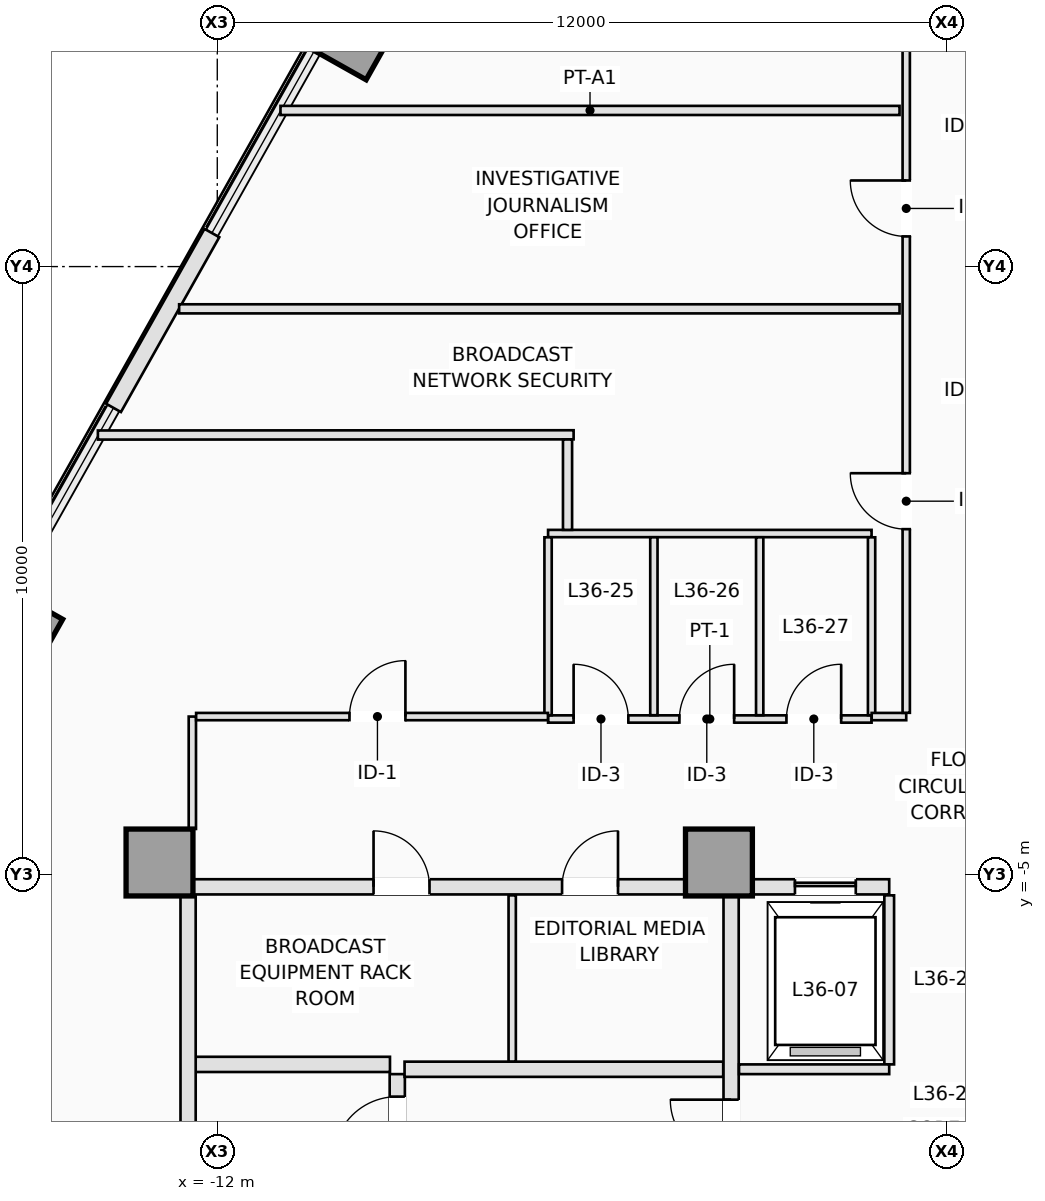
"""IFC4 building model, lengths in metres.
Left out: names, types, materials, properties, quantities, classifications, styles, units other than length and angle.
Written with IfcOpenShell. Run it as: python <this file> out.ifc"""

import sys

from ifc_helpers import new_model, si_unit, direction, frame, frame_2d, origin, origin_2d, place, context, subcontext, project, spatial, rectangle, extrude, element, fill, save


model = new_model("IFC4")
c1 = context("Model", 3, precision=1e-05, world=origin(), true_north=direction((0.0, 1.0)))
c2 = subcontext(c1, "Body", "Model", "MODEL_VIEW")
j1 = project(units=[si_unit("LENGTHUNIT", "METRE"), si_unit("PLANEANGLEUNIT", "RADIAN")], contexts=[c1])
p1 = place(None, origin())
s1 = spatial("IfcSite", under=j1, at=p1, CompositionType="ELEMENT")
p2 = place(p1, origin())
s2 = spatial("IfcBuilding", under=s1, at=p2, CompositionType="ELEMENT")
p3 = place(p2, frame((0.0, 0.0, 133.5)))
s3 = spatial("IfcBuildingStorey", under=s2, at=p3, CompositionType="ELEMENT", Elevation=133.5)
for number, where, z_axis, x_axis in (
    (1, (-12.95, -4.8, 0.0), (0.0, 0.0, 1.0), (1.0, 0.0, 0.0)),
    (2, (-3.75, -4.8, 0.0), (0.0, 0.0, 1.0), (1.0, 0.0, 0.0)),
):
    element("IfcColumn", number, at=place(p3, frame(where, z_axis=z_axis, x_axis=x_axis)), inside=s3, PredefinedType="COLUMN", context=c2, shape_type="SweptSolid", body=[
        extrude(rectangle(XDim=1.1, YDim=1.1, at=origin_2d()), origin(), (0.0, 0.0, 1.0), 3.5),
    ])
for number, where, z_axis, x_axis in (
    (3, (-9.743, 8.753, 0.0), (0.0, 0.0, 1.0), (-0.872, 0.49, 0.0)),
    (4, (-15.224, -0.991, 0.0), (0.0, 0.0, 1.0), (-0.872, 0.49, 0.0)),
):
    element("IfcColumn", number, at=place(p3, frame(where, z_axis=z_axis, x_axis=x_axis)), inside=s3, PredefinedType="COLUMN", context=c2, shape_type="SweptSolid", body=[
        extrude(rectangle(XDim=1.0, YDim=1.0, at=origin_2d()), origin(), (0.0, 0.0, 1.0), 3.5),
    ])
p4 = place(p3, frame((-13.706, 2.677, 0.0), z_axis=(0.0, 0.0, 1.0), x_axis=(0.490285834707, 0.871561701938, 0.0)))
e5 = element("IfcWall", 5, at=p4, inside=s3, PredefinedType="STANDARD", context=c2, shape_type="SweptSolid", body=[
    extrude(rectangle(XDim=3.299, YDim=0.28, at=frame_2d((1.649, 0.0))), origin(), (0.0, 0.0, 1.0), 3.25),
])
p5 = place(p3, frame((-9.04, -10.18, 0.0), z_axis=(0.0, 0.0, 1.0), x_axis=(0.0, 1.0, 0.0)))
e6 = element("IfcWall", 6, at=p5, inside=s3, PredefinedType="PARTITIONING", context=c2, shape_type="SweptSolid", body=[
    extrude(rectangle(XDim=1.9, YDim=0.25, at=frame_2d((0.95, 0.0))), origin(), (0.0, 0.0, 1.0), 3.25),
])
p6 = place(p5, frame((0.48, 0.0, 0.0)))
e7 = element("IfcOpeningElement", 7, at=p6, cuts=e6, PredefinedType="OPENING", context=c2, shape_type="SweptSolid", body=[
    extrude(rectangle(XDim=1.05, YDim=2.15, at=frame_2d((0.525, 1.075))), frame((0.0, 0.135, 0.0), z_axis=(0.0, -1.0, 0.0), x_axis=(1.0, 0.0, 0.0)), (0.0, 0.0, 1.0), 0.27),
])
p7 = place(p3, frame((-12.38, -8.12, 0.0), z_axis=(0.0, 0.0, 1.0), x_axis=(1.0, 0.0, 0.0)))
e8 = element("IfcWall", 8, at=p7, inside=s3, PredefinedType="PARTITIONING", context=c2, shape_type="SweptSolid", body=[
    extrude(rectangle(XDim=3.22, YDim=0.25, at=frame_2d((1.61, 0.0))), origin(), (0.0, 0.0, 1.0), 3.25),
])
p8 = place(p3, frame((-12.48, -10.18, 0.0), z_axis=(0.0, 0.0, 1.0), x_axis=(0.0, 1.0, 0.0)))
e9 = element("IfcWall", 9, at=p8, inside=s3, PredefinedType="PARTITIONING", context=c2, shape_type="SweptSolid", body=[
    extrude(rectangle(XDim=4.828, YDim=0.25, at=frame_2d((2.414, 0.0))), origin(), (0.0, 0.0, 1.0), 3.25),
])
p9 = place(p3, frame((-8.92, -8.2, 0.0), z_axis=(0.0, 0.0, 1.0), x_axis=(1.0, 0.0, 0.0)))
e10 = element("IfcWall", 10, at=p9, inside=s3, PredefinedType="PARTITIONING", context=c2, shape_type="SweptSolid", body=[
    extrude(rectangle(XDim=5.24, YDim=0.25, at=frame_2d((2.62, 0.0))), origin(), (0.0, 0.0, 1.0), 3.25),
])
p10 = place(p3, frame((-3.55, -15.798, 0.0), z_axis=(0.0, 0.0, 1.0), x_axis=(0.0, 1.0, 0.0)))
e11 = element("IfcWall", 11, at=p10, inside=s3, PredefinedType="PARTITIONING", context=c2, shape_type="SweptSolid", body=[
    extrude(rectangle(XDim=10.446, YDim=0.25, at=frame_2d((5.223, 0.0))), origin(), (0.0, 0.0, 1.0), 3.25),
])
p11 = place(p10, frame((6.098, 0.0, 0.0)))
e12 = element("IfcOpeningElement", 12, at=p11, cuts=e11, PredefinedType="OPENING", context=c2, shape_type="SweptSolid", body=[
    extrude(rectangle(XDim=1.0, YDim=2.15, at=frame_2d((0.5, 1.075))), frame((0.0, 0.135, 0.0), z_axis=(0.0, -1.0, 0.0), x_axis=(1.0, 0.0, 0.0)), (0.0, 0.0, 1.0), 0.27),
])
p12 = place(p3, frame((-12.398, -5.2, 0.0), z_axis=(0.0, 0.0, 1.0), x_axis=(1.0, 0.0, 0.0)))
e13 = element("IfcWall", 13, at=p12, inside=s3, PredefinedType="PARTITIONING", context=c2, shape_type="SweptSolid", body=[
    extrude(rectangle(XDim=8.096, YDim=0.25, at=frame_2d((4.048, 0.0))), origin(), (0.0, 0.0, 1.0), 3.25),
])
p13 = place(p12, frame((2.968, 0.0, 0.0)))
e14 = element("IfcOpeningElement", 14, at=p13, cuts=e13, PredefinedType="OPENING", context=c2, shape_type="SweptSolid", body=[
    extrude(rectangle(XDim=0.92, YDim=2.12, at=frame_2d((0.46, 1.06))), frame((0.0, 0.135, 0.0), z_axis=(0.0, -1.0, 0.0), x_axis=(1.0, 0.0, 0.0)), (0.0, 0.0, 1.0), 0.27),
])
p14 = place(p12, frame((6.068, 0.0, 0.0)))
e15 = element("IfcOpeningElement", 15, at=p14, cuts=e13, PredefinedType="OPENING", context=c2, shape_type="SweptSolid", body=[
    extrude(rectangle(XDim=0.92, YDim=2.12, at=frame_2d((0.46, 1.06))), frame((0.0, 0.135, 0.0), z_axis=(0.0, -1.0, 0.0), x_axis=(1.0, 0.0, 0.0)), (0.0, 0.0, 1.0), 0.27),
])
p15 = place(p3, frame((-3.198, -5.2, 0.0), z_axis=(0.0, 0.0, 1.0), x_axis=(1.0, 0.0, 0.0)))
e16 = element("IfcWall", 16, at=p15, inside=s3, PredefinedType="PARTITIONING", context=c2, shape_type="SweptSolid", body=[
    extrude(rectangle(XDim=2.248, YDim=0.25, at=frame_2d((1.124, 0.0))), origin(), (0.0, 0.0, 1.0), 3.25),
])
p16 = place(p15, frame((0.698, 0.0, 0.0)))
e17 = element("IfcOpeningElement", 17, at=p16, cuts=e16, PredefinedType="OPENING", context=c2, shape_type="SweptSolid", body=[
    extrude(rectangle(XDim=1.0, YDim=2.15, at=frame_2d((0.5, 1.075))), frame((0.0, 0.135, 0.0), z_axis=(0.0, -1.0, 0.0), x_axis=(1.0, 0.0, 0.0)), (0.0, 0.0, 1.0), 0.27),
])
p17 = place(p3, frame((-7.15, -8.073, 0.0), z_axis=(0.0, 0.0, 1.0), x_axis=(0.0, 1.0, 0.0)))
e18 = element("IfcWall", 18, at=p17, inside=s3, PredefinedType="PARTITIONING", context=c2, shape_type="SweptSolid", body=[
    extrude(rectangle(XDim=2.733, YDim=0.12, at=frame_2d((1.366, 0.0))), origin(), (0.0, 0.0, 1.0), 3.25),
])
p18 = place(p3, frame((-0.95, -8.12, 0.0), z_axis=(0.0, 0.0, 1.0), x_axis=(0.0, 1.0, 0.0)))
e19 = element("IfcWall", 19, at=p18, inside=s3, PredefinedType="PARTITIONING", context=c2, shape_type="SweptSolid", body=[
    extrude(rectangle(XDim=2.78, YDim=0.16, at=frame_2d((1.39, 0.0))), origin(), (0.0, 0.0, 1.0), 3.25),
])
p19 = place(p3, frame((-3.42, -8.2, 0.0), z_axis=(0.0, 0.0, 1.0), x_axis=(1.0, 0.0, 0.0)))
e20 = element("IfcWall", 20, at=p19, inside=s3, PredefinedType="PARTITIONING", context=c2, shape_type="SweptSolid", body=[
    extrude(rectangle(XDim=2.47, YDim=0.16, at=frame_2d((1.235, 0.0))), origin(), (0.0, 0.0, 1.0), 3.25),
])
p20 = place(p3, frame((-6.56, -2.44, 0.0), z_axis=(0.0, 0.0, 1.0), x_axis=(1.0, 0.0, 0.0)))
e21 = element("IfcWall", 21, at=p20, inside=s3, PredefinedType="PARTITIONING", context=c2, shape_type="SweptSolid", body=[
    extrude(rectangle(XDim=5.32, YDim=0.12, at=frame_2d((2.66, 0.0))), origin(), (0.0, 0.0, 1.0), 2.891),
])
p21 = place(p20, frame((0.42, 0.0, 0.0)))
e22 = element("IfcOpeningElement", 22, at=p21, cuts=e21, PredefinedType="OPENING", context=c2, shape_type="SweptSolid", body=[
    extrude(rectangle(XDim=0.9, YDim=2.12, at=frame_2d((0.45, 1.06))), frame((0.0, 0.07, 0.0), z_axis=(0.0, -1.0, 0.0), x_axis=(1.0, 0.0, 0.0)), (0.0, 0.0, 1.0), 0.14),
])
p22 = place(p20, frame((2.16, 0.0, 0.0)))
e23 = element("IfcOpeningElement", 23, at=p22, cuts=e21, PredefinedType="OPENING", context=c2, shape_type="SweptSolid", body=[
    extrude(rectangle(XDim=0.9, YDim=2.12, at=frame_2d((0.45, 1.06))), frame((0.0, 0.07, 0.0), z_axis=(0.0, -1.0, 0.0), x_axis=(1.0, 0.0, 0.0)), (0.0, 0.0, 1.0), 0.14),
])
p23 = place(p20, frame((3.92, 0.0, 0.0)))
e24 = element("IfcOpeningElement", 24, at=p23, cuts=e21, PredefinedType="OPENING", context=c2, shape_type="SweptSolid", body=[
    extrude(rectangle(XDim=0.9, YDim=2.12, at=frame_2d((0.45, 1.06))), frame((0.0, 0.07, 0.0), z_axis=(0.0, -1.0, 0.0), x_axis=(1.0, 0.0, 0.0)), (0.0, 0.0, 1.0), 0.14),
])
p24 = place(p3, frame((-6.56, 0.61, 0.0), z_axis=(0.0, 0.0, 1.0), x_axis=(1.0, 0.0, 0.0)))
e25 = element("IfcWall", 25, at=p24, inside=s3, PredefinedType="PARTITIONING", context=c2, shape_type="SweptSolid", body=[
    extrude(rectangle(XDim=5.32, YDim=0.12, at=frame_2d((2.66, 0.0))), origin(), (0.0, 0.0, 1.0), 3.25),
])
for number, where, z_axis, x_axis in (
    (26, (-6.56, -2.378, 0.0), (0.0, 0.0, 1.0), (0.0, 1.0, 0.0)),
    (27, (-4.82, -2.378, 0.0), (0.0, 0.0, 1.0), (0.0, 1.0, 0.0)),
    (28, (-3.08, -2.378, 0.0), (0.0, 0.0, 1.0), (0.0, 1.0, 0.0)),
    (29, (-1.24, -2.378, 0.0), (0.0, 0.0, 1.0), (0.0, 1.0, 0.0)),
):
    element("IfcWall", number, at=place(p3, frame(where, z_axis=z_axis, x_axis=x_axis)), inside=s3, PredefinedType="PARTITIONING", context=c2, shape_type="SweptSolid", body=[
        extrude(rectangle(XDim=2.926, YDim=0.12, at=frame_2d((1.463, 0.0))), origin(), (0.0, 0.0, 1.0), 3.25),
    ])
p25 = place(p3, frame((-12.41, -4.248, 0.0), z_axis=(0.0, 0.0, 1.0), x_axis=(0.0, 1.0, 0.0)))
e30 = element("IfcWall", 30, at=p25, inside=s3, PredefinedType="PARTITIONING", context=c2, shape_type="SweptSolid", body=[
    extrude(rectangle(XDim=1.848, YDim=0.12, at=frame_2d((0.924, 0.0))), origin(), (0.0, 0.0, 1.0), 3.25),
])
p26 = place(p3, frame((-12.348, -2.4, 0.0), z_axis=(0.0, 0.0, 1.0), x_axis=(1.0, 0.0, 0.0)))
e31 = element("IfcWall", 31, at=p26, inside=s3, PredefinedType="PARTITIONING", context=c2, shape_type="SweptSolid", body=[
    extrude(rectangle(XDim=5.786, YDim=0.12, at=frame_2d((2.893, 0.0))), origin(), (0.0, 0.0, 1.0), 3.25),
])
p27 = place(p26, frame((2.522, 0.0, 0.0)))
e32 = element("IfcOpeningElement", 32, at=p27, cuts=e31, PredefinedType="OPENING", context=c2, shape_type="SweptSolid", body=[
    extrude(rectangle(XDim=0.92, YDim=2.12, at=frame_2d((0.46, 1.06))), frame((0.0, 0.07, 0.0), z_axis=(0.0, -1.0, 0.0), x_axis=(1.0, 0.0, 0.0)), (0.0, 0.0, 1.0), 0.14),
])
p28 = place(p3, frame((-1.238, -2.4, 0.0), z_axis=(0.0, 0.0, 1.0), x_axis=(1.0, 0.0, 0.0)))
e33 = element("IfcWall", 33, at=p28, inside=s3, PredefinedType="PARTITIONING", context=c2, shape_type="SweptSolid", body=[
    extrude(rectangle(XDim=0.568, YDim=0.12, at=frame_2d((0.284, 0.0))), origin(), (0.0, 0.0, 1.0), 2.891),
])
p29 = place(p3, frame((-0.67, -2.338, 0.0), z_axis=(0.0, 0.0, 1.0), x_axis=(0.0, 1.0, 0.0)))
e34 = element("IfcWall", 34, at=p29, inside=s3, PredefinedType="PARTITIONING", context=c2, shape_type="SweptSolid", body=[
    extrude(rectangle(XDim=13.488, YDim=0.12, at=frame_2d((6.744, 0.0))), origin(), (0.0, 0.0, 1.0), 3.25),
])
p30 = place(p29, frame((11.128, 0.0, 0.0)))
e35 = element("IfcOpeningElement", 35, at=p30, cuts=e34, PredefinedType="OPENING", context=c2, shape_type="SweptSolid", body=[
    extrude(rectangle(XDim=0.92, YDim=2.12, at=frame_2d((0.46, 1.06))), frame((0.0, 0.07, 0.0), z_axis=(0.0, -1.0, 0.0), x_axis=(1.0, 0.0, 0.0)), (0.0, 0.0, 1.0), 0.14),
])
p31 = place(p29, frame((7.834, 0.0, 0.0)))
e36 = element("IfcOpeningElement", 36, at=p31, cuts=e34, PredefinedType="OPENING", context=c2, shape_type="SweptSolid", body=[
    extrude(rectangle(XDim=0.92, YDim=2.12, at=frame_2d((0.46, 1.06))), frame((0.0, 0.07, 0.0), z_axis=(0.0, -1.0, 0.0), x_axis=(1.0, 0.0, 0.0)), (0.0, 0.0, 1.0), 0.14),
])
p32 = place(p29, frame((3.02, 0.0, 0.0)))
e37 = element("IfcOpeningElement", 37, at=p32, cuts=e34, PredefinedType="OPENING", context=c2, shape_type="SweptSolid", body=[
    extrude(rectangle(XDim=0.92, YDim=2.12, at=frame_2d((0.46, 1.06))), frame((0.0, 0.07, 0.0), z_axis=(0.0, -1.0, 0.0), x_axis=(1.0, 0.0, 0.0)), (0.0, 0.0, 1.0), 0.14),
])
p33 = place(p3, frame((-0.78, 7.568, 0.0), z_axis=(0.0, 0.0, 1.0), x_axis=(-1.0, 0.0, 0.0)))
e38 = element("IfcWall", 38, at=p33, inside=s3, PredefinedType="PARTITIONING", context=c2, shape_type="SweptSolid", body=[
    extrude(rectangle(XDim=10.181, YDim=0.15, at=frame_2d((5.09, 0.0))), origin(), (0.0, 0.0, 1.0), 3.25),
])
p34 = place(p3, frame((-0.78, 4.305, 0.0), z_axis=(0.0, 0.0, 1.0), x_axis=(-1.0, 0.0, 0.0)))
e39 = element("IfcWall", 39, at=p34, inside=s3, PredefinedType="PARTITIONING", context=c2, shape_type="SweptSolid", body=[
    extrude(rectangle(XDim=11.847, YDim=0.15, at=frame_2d((5.924, 0.0))), origin(), (0.0, 0.0, 1.0), 2.891),
])
p35 = place(p3, frame((-6.14, 2.234, 0.0), z_axis=(0.0, 0.0, 1.0), x_axis=(-0.999999875343, -0.000499313382, 0.0)))
e40 = element("IfcWall", 40, at=p35, inside=s3, PredefinedType="PARTITIONING", context=c2, shape_type="SweptSolid", body=[
    extrude(rectangle(XDim=7.823, YDim=0.15, at=frame_2d((3.912, 0.0))), origin(), (0.0, 0.0, 1.0), 3.25),
])
p36 = place(p3, frame((-6.24, 0.67, 0.0), z_axis=(0.0, 0.0, 1.0), x_axis=(0.0, 1.0, 0.0)))
e41 = element("IfcWall", 41, at=p36, inside=s3, PredefinedType="PARTITIONING", context=c2, shape_type="SweptSolid", body=[
    extrude(rectangle(XDim=1.487, YDim=0.15, at=frame_2d((0.743, 0.0))), origin(), (0.0, 0.0, 1.0), 3.25),
])
p37 = place(p16, origin())
e42 = element("IfcDoor", 42, at=p37, inside=s3, OperationType="SLIDING_TO_LEFT", PredefinedType="DOOR", context=c2, shape_type="SweptSolid", body=[
    extrude(rectangle(XDim=1.0, YDim=2.15, at=frame_2d((0.5, 1.075))), frame((0.0, 0.025, 0.0), z_axis=(0.0, -1.0, 0.0), x_axis=(1.0, 0.0, 0.0)), (0.0, 0.0, 1.0), 0.05),
])
fill(e17, e42)
p38 = place(p6, origin())
e43 = element("IfcDoor", 43, at=p38, inside=s3, OperationType="SINGLE_SWING_LEFT", PredefinedType="DOOR", context=c2, shape_type="SweptSolid", body=[
    extrude(rectangle(XDim=1.05, YDim=2.15, at=frame_2d((0.525, 1.075))), frame((0.0, 0.025, 0.0), z_axis=(0.0, -1.0, 0.0), x_axis=(1.0, 0.0, 0.0)), (0.0, 0.0, 1.0), 0.05),
])
fill(e7, e43)
p39 = place(p11, origin())
e44 = element("IfcDoor", 44, at=p39, inside=s3, OperationType="SINGLE_SWING_RIGHT", PredefinedType="DOOR", context=c2, shape_type="SweptSolid", body=[
    extrude(rectangle(XDim=1.0, YDim=2.15, at=frame_2d((0.5, 1.075))), frame((0.0, 0.025, 0.0), z_axis=(0.0, -1.0, 0.0), x_axis=(1.0, 0.0, 0.0)), (0.0, 0.0, 1.0), 0.05),
])
fill(e12, e44)
p40 = place(p13, origin())
e45 = element("IfcDoor", 45, at=p40, inside=s3, OperationType="SINGLE_SWING_LEFT", PredefinedType="DOOR", context=c2, shape_type="SweptSolid", body=[
    extrude(rectangle(XDim=0.92, YDim=2.12, at=frame_2d((0.46, 1.06))), frame((0.0, 0.025, 0.0), z_axis=(0.0, -1.0, 0.0), x_axis=(1.0, 0.0, 0.0)), (0.0, 0.0, 1.0), 0.05),
])
fill(e14, e45)
p41 = place(p14, origin())
e46 = element("IfcDoor", 46, at=p41, inside=s3, OperationType="SINGLE_SWING_RIGHT", PredefinedType="DOOR", context=c2, shape_type="SweptSolid", body=[
    extrude(rectangle(XDim=0.92, YDim=2.12, at=frame_2d((0.46, 1.06))), frame((0.0, 0.025, 0.0), z_axis=(0.0, -1.0, 0.0), x_axis=(1.0, 0.0, 0.0)), (0.0, 0.0, 1.0), 0.05),
])
fill(e15, e46)
p42 = place(p21, origin())
e47 = element("IfcDoor", 47, at=p42, inside=s3, OperationType="SINGLE_SWING_LEFT", PredefinedType="DOOR", context=c2, shape_type="SweptSolid", body=[
    extrude(rectangle(XDim=0.9, YDim=2.12, at=frame_2d((0.45, 1.06))), frame((0.0, 0.025, 0.0), z_axis=(0.0, -1.0, 0.0), x_axis=(1.0, 0.0, 0.0)), (0.0, 0.0, 1.0), 0.05),
])
fill(e22, e47)
p43 = place(p22, origin())
e48 = element("IfcDoor", 48, at=p43, inside=s3, OperationType="SINGLE_SWING_RIGHT", PredefinedType="DOOR", context=c2, shape_type="SweptSolid", body=[
    extrude(rectangle(XDim=0.9, YDim=2.12, at=frame_2d((0.45, 1.06))), frame((0.0, 0.025, 0.0), z_axis=(0.0, -1.0, 0.0), x_axis=(1.0, 0.0, 0.0)), (0.0, 0.0, 1.0), 0.05),
])
fill(e23, e48)
p44 = place(p23, origin())
e49 = element("IfcDoor", 49, at=p44, inside=s3, OperationType="SINGLE_SWING_RIGHT", PredefinedType="DOOR", context=c2, shape_type="SweptSolid", body=[
    extrude(rectangle(XDim=0.9, YDim=2.12, at=frame_2d((0.45, 1.06))), frame((0.0, 0.025, 0.0), z_axis=(0.0, -1.0, 0.0), x_axis=(1.0, 0.0, 0.0)), (0.0, 0.0, 1.0), 0.05),
])
fill(e24, e49)
p45 = place(p31, origin())
e50 = element("IfcDoor", 50, at=p45, inside=s3, OperationType="SINGLE_SWING_RIGHT", PredefinedType="DOOR", context=c2, shape_type="SweptSolid", body=[
    extrude(rectangle(XDim=0.92, YDim=2.12, at=frame_2d((0.46, 1.06))), frame((0.0, 0.025, 0.0), z_axis=(0.0, -1.0, 0.0), x_axis=(1.0, 0.0, 0.0)), (0.0, 0.0, 1.0), 0.05),
])
fill(e36, e50)
p46 = place(p32, origin())
e51 = element("IfcDoor", 51, at=p46, inside=s3, OperationType="SINGLE_SWING_RIGHT", PredefinedType="DOOR", context=c2, shape_type="SweptSolid", body=[
    extrude(rectangle(XDim=0.92, YDim=2.12, at=frame_2d((0.46, 1.06))), frame((0.0, 0.025, 0.0), z_axis=(0.0, -1.0, 0.0), x_axis=(1.0, 0.0, 0.0)), (0.0, 0.0, 1.0), 0.05),
])
fill(e37, e51)
p47 = place(p27, origin())
e52 = element("IfcDoor", 52, at=p47, inside=s3, OperationType="SINGLE_SWING_RIGHT", PredefinedType="DOOR", context=c2, shape_type="SweptSolid", body=[
    extrude(rectangle(XDim=0.92, YDim=2.12, at=frame_2d((0.46, 1.06))), frame((0.0, 0.025, 0.0), z_axis=(0.0, -1.0, 0.0), x_axis=(1.0, 0.0, 0.0)), (0.0, 0.0, 1.0), 0.05),
])
fill(e32, e52)
save(model, sys.argv[1])
